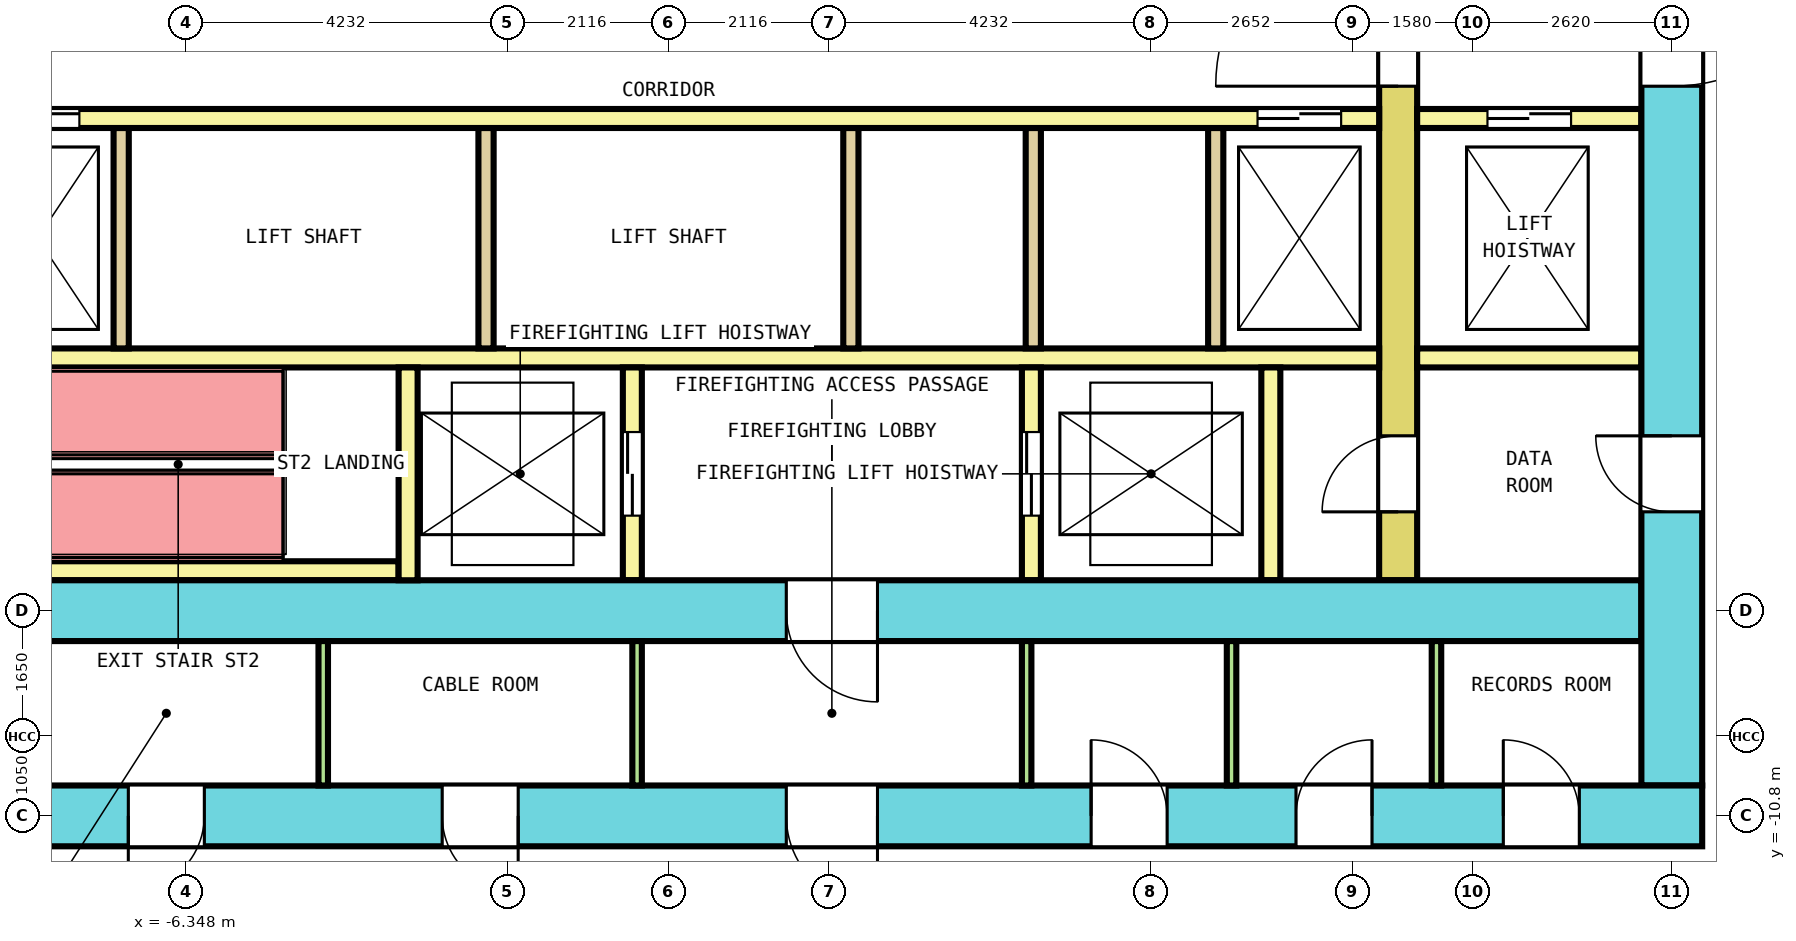
"""IFC4 building model, lengths in metres.
Left out: names, types, materials, properties, quantities, classifications, styles, units other than length and angle.
Written with IfcOpenShell. Run it as: python <this file> out.ifc"""

import sys

from ifc_helpers import new_model, si_unit, direction, frame, frame_2d, origin, place, context, subcontext, project, spatial, rectangle, extrude, element, fill, save


model = new_model("IFC4")
c1 = context("Model", 3, precision=1e-05, world=origin(), true_north=direction((0.0, 1.0)))
c2 = subcontext(c1, "Body", "Model", "MODEL_VIEW")
j1 = project(units=[si_unit("LENGTHUNIT", "METRE"), si_unit("PLANEANGLEUNIT", "RADIAN")], contexts=[c1])
p1 = place(None, origin())
s1 = spatial("IfcSite", under=j1, at=p1, CompositionType="ELEMENT")
p2 = place(p1, origin())
s2 = spatial("IfcBuilding", under=s1, at=p2, CompositionType="ELEMENT")
p3 = place(p2, frame((0.0, 0.0, 98.4)))
s3 = spatial("IfcBuildingStorey", under=s2, at=p3, CompositionType="ELEMENT", Elevation=98.4)
p4 = place(p3, frame((-13.6, -10.8, 0.0), z_axis=(0.0, 0.0, 1.0), x_axis=(1.0, 0.0, 0.0)))
e1 = element("IfcWall", 1, at=p4, inside=s3, PredefinedType="SHEAR", context=c2, shape_type="SweptSolid", body=[
    extrude(rectangle(XDim=27.2, YDim=0.8, at=frame_2d((13.6, 0.0))), origin(), (0.0, 0.0, 1.0), 4.1),
])
p5 = place(p4, frame((2.333, 0.0, 0.0)))
e2 = element("IfcOpeningElement", 2, at=p5, cuts=e1, PredefinedType="OPENING", context=c2, shape_type="SweptSolid", body=[
    extrude(rectangle(XDim=1.0, YDim=2.1, at=frame_2d((0.5, 1.05))), frame((0.0, 0.41, 0.0), z_axis=(0.0, -1.0, 0.0), x_axis=(1.0, 0.0, 0.0)), (0.0, 0.0, 1.0), 0.82),
])
p6 = place(p4, frame((6.494, 0.0, 0.0)))
e3 = element("IfcOpeningElement", 3, at=p6, cuts=e1, PredefinedType="OPENING", context=c2, shape_type="SweptSolid", body=[
    extrude(rectangle(XDim=1.0, YDim=2.1, at=frame_2d((0.5, 1.05))), frame((0.0, 0.41, 0.0), z_axis=(0.0, -1.0, 0.0), x_axis=(1.0, 0.0, 0.0)), (0.0, 0.0, 1.0), 0.82),
])
p7 = place(p4, frame((10.623, 0.0, 0.0)))
e4 = element("IfcOpeningElement", 4, at=p7, cuts=e1, PredefinedType="OPENING", context=c2, shape_type="SweptSolid", body=[
    extrude(rectangle(XDim=1.0, YDim=2.1, at=frame_2d((0.5, 1.05))), frame((0.0, 0.41, 0.0), z_axis=(0.0, -1.0, 0.0), x_axis=(1.0, 0.0, 0.0)), (0.0, 0.0, 1.0), 0.82),
])
p8 = place(p4, frame((19.16, 0.0, 0.0)))
e5 = element("IfcOpeningElement", 5, at=p8, cuts=e1, PredefinedType="OPENING", context=c2, shape_type="SweptSolid", body=[
    extrude(rectangle(XDim=1.0, YDim=2.1, at=frame_2d((0.5, 1.05))), frame((0.0, 0.41, 0.0), z_axis=(0.0, -1.0, 0.0), x_axis=(1.0, 0.0, 0.0)), (0.0, 0.0, 1.0), 0.82),
])
p9 = place(p4, frame((21.856, 0.0, 0.0)))
e6 = element("IfcOpeningElement", 6, at=p9, cuts=e1, PredefinedType="OPENING", context=c2, shape_type="SweptSolid", body=[
    extrude(rectangle(XDim=1.0, YDim=2.1, at=frame_2d((0.5, 1.05))), frame((0.0, 0.41, 0.0), z_axis=(0.0, -1.0, 0.0), x_axis=(1.0, 0.0, 0.0)), (0.0, 0.0, 1.0), 0.82),
])
p10 = place(p4, frame((24.583, 0.0, 0.0)))
e7 = element("IfcOpeningElement", 7, at=p10, cuts=e1, PredefinedType="OPENING", context=c2, shape_type="SweptSolid", body=[
    extrude(rectangle(XDim=1.0, YDim=2.1, at=frame_2d((0.5, 1.05))), frame((0.0, 0.41, 0.0), z_axis=(0.0, -1.0, 0.0), x_axis=(1.0, 0.0, 0.0)), (0.0, 0.0, 1.0), 0.82),
])
p11 = place(p4, frame((15.15, 0.0, 0.0)))
e8 = element("IfcOpeningElement", 8, at=p11, cuts=e1, PredefinedType="OPENING", context=c2, shape_type="SweptSolid", body=[
    extrude(rectangle(XDim=1.2, YDim=2.1, at=frame_2d((0.6, 1.05))), frame((0.0, 0.41, 0.0), z_axis=(0.0, -1.0, 0.0), x_axis=(1.0, 0.0, 0.0)), (0.0, 0.0, 1.0), 0.82),
])
p12 = place(p3, frame((13.2, -10.4, 0.0), z_axis=(0.0, 0.0, 1.0), x_axis=(0.0, 1.0, 0.0)))
e9 = element("IfcWall", 9, at=p12, inside=s3, PredefinedType="SHEAR", context=c2, shape_type="SweptSolid", body=[
    extrude(rectangle(XDim=20.8, YDim=0.8, at=frame_2d((10.4, 0.0))), origin(), (0.0, 0.0, 1.0), 4.1),
])
p13 = place(p12, frame((9.2, 0.0, 0.0)))
e10 = element("IfcOpeningElement", 10, at=p13, cuts=e9, PredefinedType="OPENING", context=c2, shape_type="SweptSolid", body=[
    extrude(rectangle(XDim=2.4, YDim=2.1, at=frame_2d((1.2, 1.05))), frame((0.0, 0.41, 0.0), z_axis=(0.0, -1.0, 0.0), x_axis=(1.0, 0.0, 0.0)), (0.0, 0.0, 1.0), 0.82),
])
p14 = place(p12, frame((16.1, 0.0, 0.0)))
e11 = element("IfcOpeningElement", 11, at=p14, cuts=e9, PredefinedType="OPENING", context=c2, shape_type="SweptSolid", body=[
    extrude(rectangle(XDim=1.2, YDim=2.1, at=frame_2d((0.6, 1.05))), frame((0.0, 0.41, 0.0), z_axis=(0.0, -1.0, 0.0), x_axis=(1.0, 0.0, 0.0)), (0.0, 0.0, 1.0), 0.82),
])
p15 = place(p12, frame((3.6, 0.0, 0.0)))
e12 = element("IfcOpeningElement", 12, at=p15, cuts=e9, PredefinedType="OPENING", context=c2, shape_type="SweptSolid", body=[
    extrude(rectangle(XDim=1.0, YDim=2.1, at=frame_2d((0.5, 1.05))), frame((0.0, 0.41, 0.0), z_axis=(0.0, -1.0, 0.0), x_axis=(1.0, 0.0, 0.0)), (0.0, 0.0, 1.0), 0.82),
])
p16 = place(p3, frame((-12.8, -8.1, 0.0), z_axis=(0.0, 0.0, 1.0), x_axis=(1.0, 0.0, 0.0)))
e13 = element("IfcWall", 13, at=p16, inside=s3, PredefinedType="SHEAR", context=c2, shape_type="SweptSolid", body=[
    extrude(rectangle(XDim=25.6, YDim=0.8, at=frame_2d((12.8, 0.0))), origin(), (0.0, 0.0, 1.0), 4.1),
])
p17 = place(p16, frame((14.35, 0.0, 0.0)))
e14 = element("IfcOpeningElement", 14, at=p17, cuts=e13, PredefinedType="OPENING", context=c2, shape_type="SweptSolid", body=[
    extrude(rectangle(XDim=1.2, YDim=2.1, at=frame_2d((0.6, 1.05))), frame((0.0, 0.41, 0.0), z_axis=(0.0, -1.0, 0.0), x_axis=(1.0, 0.0, 0.0)), (0.0, 0.0, 1.0), 0.82),
])
p18 = place(p3, frame((9.6, -7.7, 0.0), z_axis=(0.0, 0.0, 1.0), x_axis=(0.0, 1.0, 0.0)))
e15 = element("IfcWall", 15, at=p18, inside=s3, PredefinedType="SHEAR", context=c2, shape_type="SweptSolid", body=[
    extrude(rectangle(XDim=15.4, YDim=0.5, at=frame_2d((7.7, 0.0))), origin(), (0.0, 0.0, 1.0), 4.1),
])
p19 = place(p18, frame((6.5, 0.0, 0.0)))
e16 = element("IfcOpeningElement", 16, at=p19, cuts=e15, PredefinedType="OPENING", context=c2, shape_type="SweptSolid", body=[
    extrude(rectangle(XDim=2.4, YDim=2.1, at=frame_2d((1.2, 1.05))), frame((0.0, 0.26, 0.0), z_axis=(0.0, -1.0, 0.0), x_axis=(1.0, 0.0, 0.0)), (0.0, 0.0, 1.0), 0.52),
])
p20 = place(p18, frame((13.4, 0.0, 0.0)))
e17 = element("IfcOpeningElement", 17, at=p20, cuts=e15, PredefinedType="OPENING", context=c2, shape_type="SweptSolid", body=[
    extrude(rectangle(XDim=1.2, YDim=2.1, at=frame_2d((0.6, 1.05))), frame((0.0, 0.26, 0.0), z_axis=(0.0, -1.0, 0.0), x_axis=(1.0, 0.0, 0.0)), (0.0, 0.0, 1.0), 0.52),
])
p21 = place(p18, frame((0.9, 0.0, 0.0)))
e18 = element("IfcOpeningElement", 18, at=p21, cuts=e15, PredefinedType="OPENING", context=c2, shape_type="SweptSolid", body=[
    extrude(rectangle(XDim=1.0, YDim=2.1, at=frame_2d((0.5, 1.05))), frame((0.0, 0.26, 0.0), z_axis=(0.0, -1.0, 0.0), x_axis=(1.0, 0.0, 0.0)), (0.0, 0.0, 1.0), 0.52),
])
p22 = place(p3, frame((-9.35, -1.625, 0.0), z_axis=(0.0, 0.0, 1.0), x_axis=(1.0, 0.0, 0.0)))
e19 = element("IfcWall", 19, at=p22, inside=s3, PredefinedType="SOLIDWALL", context=c2, shape_type="SweptSolid", body=[
    extrude(rectangle(XDim=18.7, YDim=0.25, at=frame_2d((9.35, 0.0))), origin(), (0.0, 0.0, 1.0), 4.1),
])
p23 = place(p22, frame((0.5, 0.0, 0.0)))
e20 = element("IfcOpeningElement", 20, at=p23, cuts=e19, PredefinedType="OPENING", context=c2, shape_type="SweptSolid", body=[
    extrude(rectangle(XDim=1.1, YDim=2.1, at=frame_2d((0.55, 1.05))), frame((0.0, 0.135, 0.0), z_axis=(0.0, -1.0, 0.0), x_axis=(1.0, 0.0, 0.0)), (0.0, 0.0, 1.0), 0.27),
])
p24 = place(p22, frame((17.1, 0.0, 0.0)))
e21 = element("IfcOpeningElement", 21, at=p24, cuts=e19, PredefinedType="OPENING", context=c2, shape_type="SweptSolid", body=[
    extrude(rectangle(XDim=1.1, YDim=2.1, at=frame_2d((0.55, 1.05))), frame((0.0, 0.135, 0.0), z_axis=(0.0, -1.0, 0.0), x_axis=(1.0, 0.0, 0.0)), (0.0, 0.0, 1.0), 0.27),
])
p25 = place(p3, frame((9.85, -1.625, 0.0), z_axis=(0.0, 0.0, 1.0), x_axis=(1.0, 0.0, 0.0)))
e22 = element("IfcWall", 22, at=p25, inside=s3, PredefinedType="SOLIDWALL", context=c2, shape_type="SweptSolid", body=[
    extrude(rectangle(XDim=2.95, YDim=0.25, at=frame_2d((1.475, 0.0))), origin(), (0.0, 0.0, 1.0), 4.1),
])
p26 = place(p25, frame((0.925, 0.0, 0.0)))
e23 = element("IfcOpeningElement", 23, at=p26, cuts=e22, PredefinedType="OPENING", context=c2, shape_type="SweptSolid", body=[
    extrude(rectangle(XDim=1.1, YDim=2.1, at=frame_2d((0.55, 1.05))), frame((0.0, 0.135, 0.0), z_axis=(0.0, -1.0, 0.0), x_axis=(1.0, 0.0, 0.0)), (0.0, 0.0, 1.0), 0.27),
])
p27 = place(p3, frame((-9.35, -4.775, 0.0), z_axis=(0.0, 0.0, 1.0), x_axis=(1.0, 0.0, 0.0)))
e24 = element("IfcWall", 24, at=p27, inside=s3, PredefinedType="SOLIDWALL", context=c2, shape_type="SweptSolid", body=[
    extrude(rectangle(XDim=18.7, YDim=0.25, at=frame_2d((9.35, 0.0))), origin(), (0.0, 0.0, 1.0), 4.1),
])
p28 = place(p3, frame((9.85, -4.775, 0.0), z_axis=(0.0, 0.0, 1.0), x_axis=(1.0, 0.0, 0.0)))
e25 = element("IfcWall", 25, at=p28, inside=s3, PredefinedType="SOLIDWALL", context=c2, shape_type="SweptSolid", body=[
    extrude(rectangle(XDim=2.95, YDim=0.25, at=frame_2d((1.475, 0.0))), origin(), (0.0, 0.0, 1.0), 4.1),
])
for number, where, z_axis, x_axis in (
    (26, (-7.2, -4.65, 0.0), (0.0, 0.0, 1.0), (0.0, 1.0, 0.0)),
    (27, (-2.4, -4.65, 0.0), (0.0, 0.0, 1.0), (0.0, 1.0, 0.0)),
    (28, (2.4, -4.65, 0.0), (0.0, 0.0, 1.0), (0.0, 1.0, 0.0)),
    (29, (4.8, -4.65, 0.0), (0.0, 0.0, 1.0), (0.0, 1.0, 0.0)),
    (30, (7.2, -4.65, 0.0), (0.0, 0.0, 1.0), (0.0, 1.0, 0.0)),
):
    element("IfcWall", number, at=place(p3, frame(where, z_axis=z_axis, x_axis=x_axis)), inside=s3, PredefinedType="SOLIDWALL", context=c2, shape_type="SweptSolid", body=[
        extrude(rectangle(XDim=2.9, YDim=0.2, at=frame_2d((1.45, 0.0))), origin(), (0.0, 0.0, 1.0), 4.1),
    ])
p29 = place(p3, frame((-9.35, -7.575, 0.0), z_axis=(0.0, 0.0, 1.0), x_axis=(1.0, 0.0, 0.0)))
e31 = element("IfcWall", 31, at=p29, inside=s3, PredefinedType="SOLIDWALL", context=c2, shape_type="SweptSolid", body=[
    extrude(rectangle(XDim=5.8, YDim=0.25, at=frame_2d((2.9, 0.0))), origin(), (0.0, 0.0, 1.0), 4.1),
])
p30 = place(p3, frame((-3.425, -7.7, 0.0), z_axis=(0.0, 0.0, 1.0), x_axis=(0.0, 1.0, 0.0)))
e32 = element("IfcWall", 32, at=p30, inside=s3, PredefinedType="SOLIDWALL", context=c2, shape_type="SweptSolid", body=[
    extrude(rectangle(XDim=2.8, YDim=0.25, at=frame_2d((1.4, 0.0))), origin(), (0.0, 0.0, 1.0), 4.1),
])
p31 = place(p3, frame((-0.475, -7.7, 0.0), z_axis=(0.0, 0.0, 1.0), x_axis=(0.0, 1.0, 0.0)))
e33 = element("IfcWall", 33, at=p31, inside=s3, PredefinedType="SOLIDWALL", context=c2, shape_type="SweptSolid", body=[
    extrude(rectangle(XDim=2.8, YDim=0.25, at=frame_2d((1.4, 0.0))), origin(), (0.0, 0.0, 1.0), 4.1),
])
p32 = place(p31, frame((0.85, 0.0, 0.0)))
e34 = element("IfcOpeningElement", 34, at=p32, cuts=e33, PredefinedType="OPENING", context=c2, shape_type="SweptSolid", body=[
    extrude(rectangle(XDim=1.1, YDim=2.1, at=frame_2d((0.55, 1.05))), frame((0.0, 0.135, 0.0), z_axis=(0.0, -1.0, 0.0), x_axis=(1.0, 0.0, 0.0)), (0.0, 0.0, 1.0), 0.27),
])
p33 = place(p3, frame((4.775, -7.7, 0.0), z_axis=(0.0, 0.0, 1.0), x_axis=(0.0, 1.0, 0.0)))
e35 = element("IfcWall", 35, at=p33, inside=s3, PredefinedType="SOLIDWALL", context=c2, shape_type="SweptSolid", body=[
    extrude(rectangle(XDim=2.8, YDim=0.25, at=frame_2d((1.4, 0.0))), origin(), (0.0, 0.0, 1.0), 4.1),
])
p34 = place(p33, frame((0.85, 0.0, 0.0)))
e36 = element("IfcOpeningElement", 36, at=p34, cuts=e35, PredefinedType="OPENING", context=c2, shape_type="SweptSolid", body=[
    extrude(rectangle(XDim=1.1, YDim=2.1, at=frame_2d((0.55, 1.05))), frame((0.0, 0.135, 0.0), z_axis=(0.0, -1.0, 0.0), x_axis=(1.0, 0.0, 0.0)), (0.0, 0.0, 1.0), 0.27),
])
p35 = place(p3, frame((7.925, -7.7, 0.0), z_axis=(0.0, 0.0, 1.0), x_axis=(0.0, 1.0, 0.0)))
e37 = element("IfcWall", 37, at=p35, inside=s3, PredefinedType="SOLIDWALL", context=c2, shape_type="SweptSolid", body=[
    extrude(rectangle(XDim=2.8, YDim=0.25, at=frame_2d((1.4, 0.0))), origin(), (0.0, 0.0, 1.0), 4.1),
])
for number, where, z_axis, x_axis in (
    (38, (-4.542, -10.4, 0.0), (0.0, 0.0, 1.0), (0.0, 1.0, 0.0)),
    (39, (-0.413, -10.4, 0.0), (0.0, 0.0, 1.0), (0.0, 1.0, 0.0)),
    (40, (4.712, -10.4, 0.0), (0.0, 0.0, 1.0), (0.0, 1.0, 0.0)),
    (41, (7.408, -10.4, 0.0), (0.0, 0.0, 1.0), (0.0, 1.0, 0.0)),
    (42, (10.104, -10.4, 0.0), (0.0, 0.0, 1.0), (0.0, 1.0, 0.0)),
):
    element("IfcWall", number, at=place(p3, frame(where, z_axis=z_axis, x_axis=x_axis)), inside=s3, PredefinedType="PARTITIONING", context=c2, shape_type="SweptSolid", body=[
        extrude(rectangle(XDim=1.9, YDim=0.125, at=frame_2d((0.95, 0.0))), origin(), (0.0, 0.0, 1.0), 4.1),
    ])
p36 = place(p23, origin())
e43 = element("IfcDoor", 43, at=p36, inside=s3, OperationType="DOUBLE_DOOR_SLIDING", PredefinedType="DOOR", context=c2, shape_type="SweptSolid", body=[
    extrude(rectangle(XDim=1.1, YDim=2.1, at=frame_2d((0.55, 1.05))), frame((0.0, 0.075, 0.0), z_axis=(0.0, -1.0, 0.0), x_axis=(1.0, 0.0, 0.0)), (0.0, 0.0, 1.0), 0.15),
])
fill(e20, e43)
p37 = place(p24, origin())
e44 = element("IfcDoor", 44, at=p37, inside=s3, OperationType="DOUBLE_DOOR_SLIDING", PredefinedType="DOOR", context=c2, shape_type="SweptSolid", body=[
    extrude(rectangle(XDim=1.1, YDim=2.1, at=frame_2d((0.55, 1.05))), frame((0.0, 0.075, 0.0), z_axis=(0.0, -1.0, 0.0), x_axis=(1.0, 0.0, 0.0)), (0.0, 0.0, 1.0), 0.15),
])
fill(e21, e44)
p38 = place(p26, origin())
e45 = element("IfcDoor", 45, at=p38, inside=s3, OperationType="DOUBLE_DOOR_SLIDING", PredefinedType="DOOR", context=c2, shape_type="SweptSolid", body=[
    extrude(rectangle(XDim=1.1, YDim=2.1, at=frame_2d((0.55, 1.05))), frame((0.0, 0.075, 0.0), z_axis=(0.0, -1.0, 0.0), x_axis=(1.0, 0.0, 0.0)), (0.0, 0.0, 1.0), 0.15),
])
fill(e23, e45)
p39 = place(p32, origin())
e46 = element("IfcDoor", 46, at=p39, inside=s3, OperationType="DOUBLE_DOOR_SLIDING", PredefinedType="DOOR", context=c2, shape_type="SweptSolid", body=[
    extrude(rectangle(XDim=1.1, YDim=2.1, at=frame_2d((0.55, 1.05))), frame((0.0, 0.075, 0.0), z_axis=(0.0, -1.0, 0.0), x_axis=(1.0, 0.0, 0.0)), (0.0, 0.0, 1.0), 0.15),
])
fill(e34, e46)
p40 = place(p34, origin())
e47 = element("IfcDoor", 47, at=p40, inside=s3, OperationType="DOUBLE_DOOR_SLIDING", PredefinedType="DOOR", context=c2, shape_type="SweptSolid", body=[
    extrude(rectangle(XDim=1.1, YDim=2.1, at=frame_2d((0.55, 1.05))), frame((0.0, 0.075, 0.0), z_axis=(0.0, -1.0, 0.0), x_axis=(1.0, 0.0, 0.0)), (0.0, 0.0, 1.0), 0.15),
])
fill(e36, e47)
p41 = place(p19, origin())
e48 = element("IfcDoor", 48, at=p41, inside=s3, OperationType="DOUBLE_DOOR_SINGLE_SWING", PredefinedType="DOOR", context=c2, shape_type="SweptSolid", body=[
    extrude(rectangle(XDim=2.4, YDim=2.1, at=frame_2d((1.2, 1.05))), frame((0.0, 0.2, 0.0), z_axis=(0.0, -1.0, 0.0), x_axis=(1.0, 0.0, 0.0)), (0.0, 0.0, 1.0), 0.4),
])
fill(e16, e48)
p42 = place(p13, origin())
e49 = element("IfcDoor", 49, at=p42, inside=s3, OperationType="DOUBLE_DOOR_SINGLE_SWING", PredefinedType="DOOR", context=c2, shape_type="SweptSolid", body=[
    extrude(rectangle(XDim=2.4, YDim=2.1, at=frame_2d((1.2, 1.05))), frame((0.0, 0.3, 0.0), z_axis=(0.0, -1.0, 0.0), x_axis=(1.0, 0.0, 0.0)), (0.0, 0.0, 1.0), 0.6),
])
fill(e10, e49)
p43 = place(p17, origin())
e50 = element("IfcDoor", 50, at=p43, inside=s3, OperationType="SINGLE_SWING_RIGHT", PredefinedType="DOOR", context=c2, shape_type="SweptSolid", body=[
    extrude(rectangle(XDim=1.2, YDim=2.1, at=frame_2d((0.6, 1.05))), frame((0.0, 0.3, 0.0), z_axis=(0.0, -1.0, 0.0), x_axis=(1.0, 0.0, 0.0)), (0.0, 0.0, 1.0), 0.6),
])
fill(e14, e50)
p44 = place(p21, origin())
e51 = element("IfcDoor", 51, at=p44, inside=s3, OperationType="SINGLE_SWING_RIGHT", PredefinedType="DOOR", context=c2, shape_type="SweptSolid", body=[
    extrude(rectangle(XDim=1.0, YDim=2.1, at=frame_2d((0.5, 1.05))), frame((0.0, 0.2, 0.0), z_axis=(0.0, -1.0, 0.0), x_axis=(1.0, 0.0, 0.0)), (0.0, 0.0, 1.0), 0.4),
])
fill(e18, e51)
p45 = place(p15, origin())
e52 = element("IfcDoor", 52, at=p45, inside=s3, OperationType="SINGLE_SWING_LEFT", PredefinedType="DOOR", context=c2, shape_type="SweptSolid", body=[
    extrude(rectangle(XDim=1.0, YDim=2.1, at=frame_2d((0.5, 1.05))), frame((0.0, 0.3, 0.0), z_axis=(0.0, -1.0, 0.0), x_axis=(1.0, 0.0, 0.0)), (0.0, 0.0, 1.0), 0.6),
])
fill(e12, e52)
p46 = place(p6, origin())
e53 = element("IfcDoor", 53, at=p46, inside=s3, OperationType="SINGLE_SWING_LEFT", PredefinedType="DOOR", context=c2, shape_type="SweptSolid", body=[
    extrude(rectangle(XDim=1.0, YDim=2.1, at=frame_2d((0.5, 1.05))), frame((0.0, 0.3, 0.0), z_axis=(0.0, -1.0, 0.0), x_axis=(1.0, 0.0, 0.0)), (0.0, 0.0, 1.0), 0.6),
])
fill(e3, e53)
p47 = place(p7, origin())
e54 = element("IfcDoor", 54, at=p47, inside=s3, OperationType="SINGLE_SWING_RIGHT", PredefinedType="DOOR", context=c2, shape_type="SweptSolid", body=[
    extrude(rectangle(XDim=1.0, YDim=2.1, at=frame_2d((0.5, 1.05))), frame((0.0, 0.3, 0.0), z_axis=(0.0, -1.0, 0.0), x_axis=(1.0, 0.0, 0.0)), (0.0, 0.0, 1.0), 0.6),
])
fill(e4, e54)
p48 = place(p8, origin())
e55 = element("IfcDoor", 55, at=p48, inside=s3, OperationType="SINGLE_SWING_LEFT", PredefinedType="DOOR", context=c2, shape_type="SweptSolid", body=[
    extrude(rectangle(XDim=1.0, YDim=2.1, at=frame_2d((0.5, 1.05))), frame((0.0, 0.3, 0.0), z_axis=(0.0, -1.0, 0.0), x_axis=(1.0, 0.0, 0.0)), (0.0, 0.0, 1.0), 0.6),
])
fill(e5, e55)
p49 = place(p9, origin())
e56 = element("IfcDoor", 56, at=p49, inside=s3, OperationType="SINGLE_SWING_RIGHT", PredefinedType="DOOR", context=c2, shape_type="SweptSolid", body=[
    extrude(rectangle(XDim=1.0, YDim=2.1, at=frame_2d((0.5, 1.05))), frame((0.0, 0.3, 0.0), z_axis=(0.0, -1.0, 0.0), x_axis=(1.0, 0.0, 0.0)), (0.0, 0.0, 1.0), 0.6),
])
fill(e6, e56)
p50 = place(p10, origin())
e57 = element("IfcDoor", 57, at=p50, inside=s3, OperationType="SINGLE_SWING_LEFT", PredefinedType="DOOR", context=c2, shape_type="SweptSolid", body=[
    extrude(rectangle(XDim=1.0, YDim=2.1, at=frame_2d((0.5, 1.05))), frame((0.0, 0.3, 0.0), z_axis=(0.0, -1.0, 0.0), x_axis=(1.0, 0.0, 0.0)), (0.0, 0.0, 1.0), 0.6),
])
fill(e7, e57)
p51 = place(p11, origin())
e58 = element("IfcDoor", 58, at=p51, inside=s3, OperationType="SINGLE_SWING_RIGHT", PredefinedType="DOOR", context=c2, shape_type="SweptSolid", body=[
    extrude(rectangle(XDim=1.2, YDim=2.1, at=frame_2d((0.6, 1.05))), frame((0.0, 0.3, 0.0), z_axis=(0.0, -1.0, 0.0), x_axis=(1.0, 0.0, 0.0)), (0.0, 0.0, 1.0), 0.6),
])
fill(e8, e58)
save(model, sys.argv[1])
